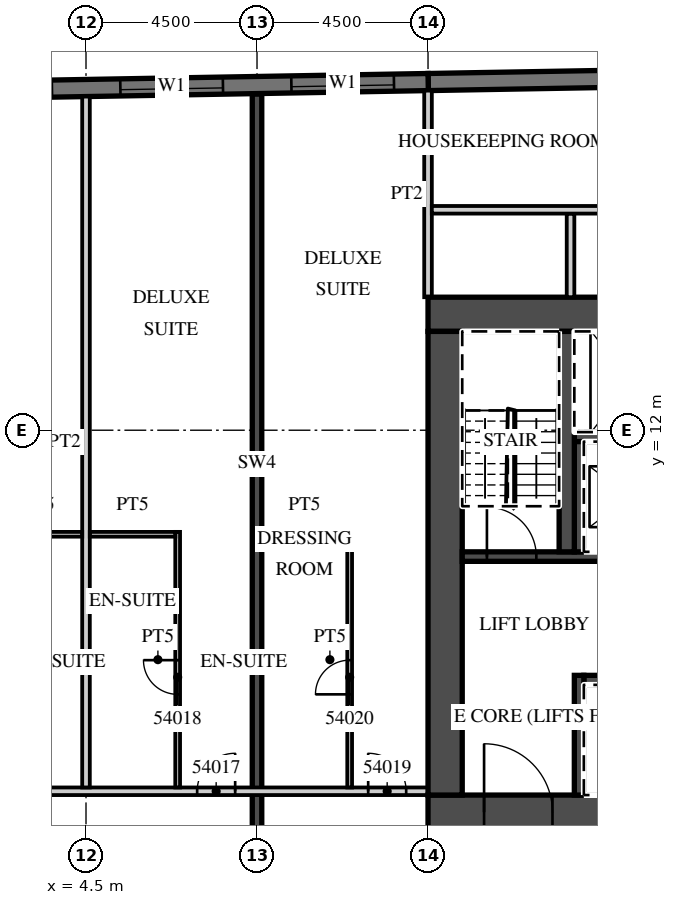
"""IFC4 building model, lengths in metres.
Left out: names, types, materials, properties, quantities, classifications, styles, units other than length and angle.
Written with IfcOpenShell. Run it as: python <this file> out.ifc"""

import sys

from ifc_helpers import new_model, si_unit, direction, frame, frame_2d, origin, place, context, subcontext, project, spatial, rectangle, extrude, element, fill, save


model = new_model("IFC4")
c1 = context("Model", 3, precision=1e-05, world=origin(), true_north=direction((0.0, 1.0)))
c2 = subcontext(c1, "Body", "Model", "MODEL_VIEW")
j1 = project(units=[si_unit("LENGTHUNIT", "METRE"), si_unit("PLANEANGLEUNIT", "RADIAN")], contexts=[c1])
p1 = place(None, origin())
s1 = spatial("IfcSite", under=j1, at=p1, CompositionType="ELEMENT")
p2 = place(p1, origin())
s2 = spatial("IfcBuilding", under=s1, at=p2, CompositionType="ELEMENT")
p3 = place(p2, frame((0.0, 0.0, 224.3)))
s3 = spatial("IfcBuildingStorey", under=s2, at=p3, CompositionType="ELEMENT", Elevation=224.3)
p4 = place(p3, frame((9.0, 1.4, 0.0), z_axis=(0.0, 0.0, 1.0), x_axis=(0.0, 1.0, 0.0)))
e1 = element("IfcWall", 1, at=p4, inside=s3, PredefinedType="SHEAR", context=c2, shape_type="SweptSolid", body=[
    extrude(rectangle(XDim=19.446, YDim=0.25, at=frame_2d((9.723, 0.0))), origin(), (0.0, 0.0, 1.0), 3.3),
])
p5 = place(p3, frame((31.504, 21.476, 0.0), z_axis=(0.0, 0.0, 1.0), x_axis=(-0.999847677887, -0.017453395744, 0.0)))
e2 = element("IfcWall", 2, at=p5, inside=s3, PredefinedType="SOLIDWALL", context=c2, shape_type="SweptSolid", body=[
    extrude(rectangle(XDim=18.003, YDim=0.45, at=frame_2d((9.001, 0.0))), origin(), (0.0, 0.0, 1.0), 3.02),
])
p6 = place(p3, frame((13.504, 21.161, 0.0), z_axis=(0.0, 0.0, 1.0), x_axis=(-0.999847763257, -0.017448504532, 0.0)))
e3 = element("IfcWall", 3, at=p6, inside=s3, PredefinedType="SOLIDWALL", context=c2, shape_type="SweptSolid", body=[
    extrude(rectangle(XDim=46.859, YDim=0.45, at=frame_2d((23.43, 0.0))), origin(), (0.0, 0.0, 1.0), 3.02),
])
p7 = place(p6, frame((0.9, 0.0, 0.45)))
e4 = element("IfcOpeningElement", 4, at=p7, cuts=e3, PredefinedType="OPENING", context=c2, shape_type="SweptSolid", body=[
    extrude(rectangle(XDim=2.7, YDim=2.25, at=frame_2d((1.35, 1.125))), frame((0.0, 0.235, 0.0), z_axis=(0.0, -1.0, 0.0), x_axis=(1.0, 0.0, 0.0)), (0.0, 0.0, 1.0), 0.47),
])
p8 = place(p6, frame((5.401, 0.0, 0.45)))
e5 = element("IfcOpeningElement", 5, at=p8, cuts=e3, PredefinedType="OPENING", context=c2, shape_type="SweptSolid", body=[
    extrude(rectangle(XDim=2.7, YDim=2.25, at=frame_2d((1.35, 1.125))), frame((0.0, 0.235, 0.0), z_axis=(0.0, -1.0, 0.0), x_axis=(1.0, 0.0, 0.0)), (0.0, 0.0, 1.0), 0.47),
])
p9 = place(p6, frame((9.902, 0.0, 0.45)))
e6 = element("IfcOpeningElement", 6, at=p9, cuts=e3, PredefinedType="OPENING", context=c2, shape_type="SweptSolid", body=[
    extrude(rectangle(XDim=2.7, YDim=2.25, at=frame_2d((1.35, 1.125))), frame((0.0, 0.235, 0.0), z_axis=(0.0, -1.0, 0.0), x_axis=(1.0, 0.0, 0.0)), (0.0, 0.0, 1.0), 0.47),
])
p10 = place(p6, frame((14.402, 0.0, 0.45)))
e7 = element("IfcOpeningElement", 7, at=p10, cuts=e3, PredefinedType="OPENING", context=c2, shape_type="SweptSolid", body=[
    extrude(rectangle(XDim=2.7, YDim=2.25, at=frame_2d((1.35, 1.125))), frame((0.0, 0.235, 0.0), z_axis=(0.0, -1.0, 0.0), x_axis=(1.0, 0.0, 0.0)), (0.0, 0.0, 1.0), 0.47),
])
p11 = place(p6, frame((18.903, 0.0, 0.45)))
e8 = element("IfcOpeningElement", 8, at=p11, cuts=e3, PredefinedType="OPENING", context=c2, shape_type="SweptSolid", body=[
    extrude(rectangle(XDim=2.7, YDim=2.25, at=frame_2d((1.35, 1.125))), frame((0.0, 0.235, 0.0), z_axis=(0.0, -1.0, 0.0), x_axis=(1.0, 0.0, 0.0)), (0.0, 0.0, 1.0), 0.47),
])
p12 = place(p6, frame((23.404, 0.0, 0.45)))
e9 = element("IfcOpeningElement", 9, at=p12, cuts=e3, PredefinedType="OPENING", context=c2, shape_type="SweptSolid", body=[
    extrude(rectangle(XDim=2.7, YDim=2.25, at=frame_2d((1.35, 1.125))), frame((0.0, 0.235, 0.0), z_axis=(0.0, -1.0, 0.0), x_axis=(1.0, 0.0, 0.0)), (0.0, 0.0, 1.0), 0.47),
])
p13 = place(p6, frame((27.904, 0.0, 0.45)))
e10 = element("IfcOpeningElement", 10, at=p13, cuts=e3, PredefinedType="OPENING", context=c2, shape_type="SweptSolid", body=[
    extrude(rectangle(XDim=2.7, YDim=2.25, at=frame_2d((1.35, 1.125))), frame((0.0, 0.235, 0.0), z_axis=(0.0, -1.0, 0.0), x_axis=(1.0, 0.0, 0.0)), (0.0, 0.0, 1.0), 0.47),
])
p14 = place(p6, frame((32.405, 0.0, 0.45)))
e11 = element("IfcOpeningElement", 11, at=p14, cuts=e3, PredefinedType="OPENING", context=c2, shape_type="SweptSolid", body=[
    extrude(rectangle(XDim=2.7, YDim=2.25, at=frame_2d((1.35, 1.125))), frame((0.0, 0.235, 0.0), z_axis=(0.0, -1.0, 0.0), x_axis=(1.0, 0.0, 0.0)), (0.0, 0.0, 1.0), 0.47),
])
p15 = place(p6, frame((36.906, 0.0, 0.45)))
e12 = element("IfcOpeningElement", 12, at=p15, cuts=e3, PredefinedType="OPENING", context=c2, shape_type="SweptSolid", body=[
    extrude(rectangle(XDim=2.7, YDim=2.25, at=frame_2d((1.35, 1.125))), frame((0.0, 0.235, 0.0), z_axis=(0.0, -1.0, 0.0), x_axis=(1.0, 0.0, 0.0)), (0.0, 0.0, 1.0), 0.47),
])
p16 = place(p6, frame((41.406, 0.0, 0.45)))
e13 = element("IfcOpeningElement", 13, at=p16, cuts=e3, PredefinedType="OPENING", context=c2, shape_type="SweptSolid", body=[
    extrude(rectangle(XDim=2.7, YDim=2.25, at=frame_2d((1.35, 1.125))), frame((0.0, 0.235, 0.0), z_axis=(0.0, -1.0, 0.0), x_axis=(1.0, 0.0, 0.0)), (0.0, 0.0, 1.0), 0.47),
])
p17 = place(p3, frame((13.5, 15.5, 0.0), z_axis=(0.0, 0.0, 1.0), x_axis=(0.0, 1.0, 0.0)))
e14 = element("IfcWall", 14, at=p17, inside=s3, PredefinedType="PARTITIONING", context=c2, shape_type="SweptSolid", body=[
    extrude(rectangle(XDim=5.436, YDim=0.2, at=frame_2d((2.718, 0.0))), origin(), (0.0, 0.0, 1.0), 3.02),
])
p18 = place(p3, frame((-13.5, 2.5, 0.0), z_axis=(0.0, 0.0, 1.0), x_axis=(1.0, 0.0, 0.0)))
e15 = element("IfcWall", 15, at=p18, inside=s3, PredefinedType="PARTITIONING", context=c2, shape_type="SweptSolid", body=[
    extrude(rectangle(XDim=27.0, YDim=0.2, at=frame_2d((13.5, 0.0))), origin(), (0.0, 0.0, 1.0), 3.02),
])
p19 = place(p18, frame((2.925, 0.0, 0.0)))
e16 = element("IfcOpeningElement", 16, at=p19, cuts=e15, PredefinedType="OPENING", context=c2, shape_type="SweptSolid", body=[
    extrude(rectangle(XDim=1.0, YDim=2.1, at=frame_2d((0.5, 1.05))), frame((0.0, 0.11, 0.0), z_axis=(0.0, -1.0, 0.0), x_axis=(1.0, 0.0, 0.0)), (0.0, 0.0, 1.0), 0.22),
])
p20 = place(p18, frame((7.45, 0.0, 0.0)))
e17 = element("IfcOpeningElement", 17, at=p20, cuts=e15, PredefinedType="OPENING", context=c2, shape_type="SweptSolid", body=[
    extrude(rectangle(XDim=1.0, YDim=2.1, at=frame_2d((0.5, 1.05))), frame((0.0, 0.11, 0.0), z_axis=(0.0, -1.0, 0.0), x_axis=(1.0, 0.0, 0.0)), (0.0, 0.0, 1.0), 0.22),
])
p21 = place(p18, frame((11.925, 0.0, 0.0)))
e18 = element("IfcOpeningElement", 18, at=p21, cuts=e15, PredefinedType="OPENING", context=c2, shape_type="SweptSolid", body=[
    extrude(rectangle(XDim=1.0, YDim=2.1, at=frame_2d((0.5, 1.05))), frame((0.0, 0.11, 0.0), z_axis=(0.0, -1.0, 0.0), x_axis=(1.0, 0.0, 0.0)), (0.0, 0.0, 1.0), 0.22),
])
p22 = place(p18, frame((14.075, 0.0, 0.0)))
e19 = element("IfcOpeningElement", 19, at=p22, cuts=e15, PredefinedType="OPENING", context=c2, shape_type="SweptSolid", body=[
    extrude(rectangle(XDim=1.0, YDim=2.1, at=frame_2d((0.5, 1.05))), frame((0.0, 0.11, 0.0), z_axis=(0.0, -1.0, 0.0), x_axis=(1.0, 0.0, 0.0)), (0.0, 0.0, 1.0), 0.22),
])
p23 = place(p18, frame((20.925, 0.0, 0.0)))
e20 = element("IfcOpeningElement", 20, at=p23, cuts=e15, PredefinedType="OPENING", context=c2, shape_type="SweptSolid", body=[
    extrude(rectangle(XDim=1.0, YDim=2.1, at=frame_2d((0.5, 1.05))), frame((0.0, 0.11, 0.0), z_axis=(0.0, -1.0, 0.0), x_axis=(1.0, 0.0, 0.0)), (0.0, 0.0, 1.0), 0.22),
])
p24 = place(p18, frame((25.425, 0.0, 0.0)))
e21 = element("IfcOpeningElement", 21, at=p24, cuts=e15, PredefinedType="OPENING", context=c2, shape_type="SweptSolid", body=[
    extrude(rectangle(XDim=1.0, YDim=2.1, at=frame_2d((0.5, 1.05))), frame((0.0, 0.11, 0.0), z_axis=(0.0, -1.0, 0.0), x_axis=(1.0, 0.0, 0.0)), (0.0, 0.0, 1.0), 0.22),
])
p25 = place(p3, frame((4.5, 2.6, 0.0), z_axis=(0.0, 0.0, 1.0), x_axis=(0.0, 1.0, 0.0)))
e22 = element("IfcWall", 22, at=p25, inside=s3, PredefinedType="PARTITIONING", context=c2, shape_type="SweptSolid", body=[
    extrude(rectangle(XDim=18.179, YDim=0.2, at=frame_2d((9.089, 0.0))), origin(), (0.0, 0.0, 1.0), 3.02),
])
p26 = place(p3, frame((2.15, 9.262, 0.0), z_axis=(0.0, 0.0, 1.0), x_axis=(1.0, 0.0, 0.0)))
e23 = element("IfcWall", 23, at=p26, inside=s3, PredefinedType="PARTITIONING", context=c2, shape_type="SweptSolid", body=[
    extrude(rectangle(XDim=2.25, YDim=0.125, at=frame_2d((1.125, 0.0))), origin(), (0.0, 0.0, 1.0), 3.02),
])
p27 = place(p3, frame((6.912, 2.6, 0.0), z_axis=(0.0, 0.0, 1.0), x_axis=(0.0, 1.0, 0.0)))
e24 = element("IfcWall", 24, at=p27, inside=s3, PredefinedType="PARTITIONING", context=c2, shape_type="SweptSolid", body=[
    extrude(rectangle(XDim=6.725, YDim=0.125, at=frame_2d((3.362, 0.0))), origin(), (0.0, 0.0, 1.0), 3.02),
])
p28 = place(p27, frame((2.45, 0.0, 0.0)))
e25 = element("IfcOpeningElement", 25, at=p28, cuts=e24, PredefinedType="OPENING", context=c2, shape_type="SweptSolid", body=[
    extrude(rectangle(XDim=0.9, YDim=2.1, at=frame_2d((0.45, 1.05))), frame((0.0, 0.073, 0.0), z_axis=(0.0, -1.0, 0.0), x_axis=(1.0, 0.0, 0.0)), (0.0, 0.0, 1.0), 0.145),
])
p29 = place(p3, frame((4.6, 9.262, 0.0), z_axis=(0.0, 0.0, 1.0), x_axis=(1.0, 0.0, 0.0)))
e26 = element("IfcWall", 26, at=p29, inside=s3, PredefinedType="PARTITIONING", context=c2, shape_type="SweptSolid", body=[
    extrude(rectangle(XDim=2.25, YDim=0.125, at=frame_2d((1.125, 0.0))), origin(), (0.0, 0.0, 1.0), 3.02),
])
p30 = place(p3, frame((11.438, 2.6, 0.0), z_axis=(0.0, 0.0, 1.0), x_axis=(0.0, 1.0, 0.0)))
e27 = element("IfcWall", 27, at=p30, inside=s3, PredefinedType="PARTITIONING", context=c2, shape_type="SweptSolid", body=[
    extrude(rectangle(XDim=6.725, YDim=0.125, at=frame_2d((3.362, 0.0))), origin(), (0.0, 0.0, 1.0), 3.02),
])
p31 = place(p30, frame((2.45, 0.0, 0.0)))
e28 = element("IfcOpeningElement", 28, at=p31, cuts=e27, PredefinedType="OPENING", context=c2, shape_type="SweptSolid", body=[
    extrude(rectangle(XDim=0.9, YDim=2.1, at=frame_2d((0.45, 1.05))), frame((0.0, 0.073, 0.0), z_axis=(0.0, -1.0, 0.0), x_axis=(1.0, 0.0, 0.0)), (0.0, 0.0, 1.0), 0.145),
])
p32 = place(p3, frame((9.125, 9.262, 0.0), z_axis=(0.0, 0.0, 1.0), x_axis=(1.0, 0.0, 0.0)))
e29 = element("IfcWall", 29, at=p32, inside=s3, PredefinedType="PARTITIONING", context=c2, shape_type="SweptSolid", body=[
    extrude(rectangle(XDim=2.25, YDim=0.125, at=frame_2d((1.125, 0.0))), origin(), (0.0, 0.0, 1.0), 3.02),
])
p33 = place(p3, frame((13.5, 1.95, 0.0), z_axis=(0.0, 0.0, 1.0), x_axis=(1.0, 0.0, 0.0)))
e30 = element("IfcWall", 30, at=p33, inside=s3, PredefinedType="SHEAR", context=c2, shape_type="SweptSolid", body=[
    extrude(rectangle(XDim=18.0, YDim=0.9, at=frame_2d((9.0, 0.0))), origin(), (0.0, 0.0, 1.0), 3.02),
])
p34 = place(p33, frame((1.475, 0.0, 0.0)))
e31 = element("IfcOpeningElement", 31, at=p34, cuts=e30, PredefinedType="OPENING", context=c2, shape_type="SweptSolid", body=[
    extrude(rectangle(XDim=1.8, YDim=2.1, at=frame_2d((0.9, 1.05))), frame((0.0, 0.46, 0.0), z_axis=(0.0, -1.0, 0.0), x_axis=(1.0, 0.0, 0.0)), (0.0, 0.0, 1.0), 0.92),
])
p35 = place(p3, frame((13.5, 15.05, 0.0), z_axis=(0.0, 0.0, 1.0), x_axis=(1.0, 0.0, 0.0)))
e32 = element("IfcWall", 32, at=p35, inside=s3, PredefinedType="SHEAR", context=c2, shape_type="SweptSolid", body=[
    extrude(rectangle(XDim=6.8, YDim=0.9, at=frame_2d((3.4, 0.0))), origin(), (0.0, 0.0, 1.0), 3.02),
])
p36 = place(p35, frame((4.725, 0.0, 0.0)))
e33 = element("IfcOpeningElement", 33, at=p36, cuts=e32, PredefinedType="OPENING", context=c2, shape_type="SweptSolid", body=[
    extrude(rectangle(XDim=1.2, YDim=2.1, at=frame_2d((0.6, 1.05))), frame((0.0, 0.46, 0.0), z_axis=(0.0, -1.0, 0.0), x_axis=(1.0, 0.0, 0.0)), (0.0, 0.0, 1.0), 0.92),
])
p37 = place(p3, frame((13.95, 2.4, 0.0), z_axis=(0.0, 0.0, 1.0), x_axis=(0.0, 1.0, 0.0)))
e34 = element("IfcWall", 34, at=p37, inside=s3, PredefinedType="SHEAR", context=c2, shape_type="SweptSolid", body=[
    extrude(rectangle(XDim=12.2, YDim=0.9, at=frame_2d((6.1, 0.0))), origin(), (0.0, 0.0, 1.0), 3.02),
])
p38 = place(p3, frame((17.6, 5.425, 0.0), z_axis=(0.0, 0.0, 1.0), x_axis=(1.0, 0.0, 0.0)))
e35 = element("IfcWall", 35, at=p38, inside=s3, PredefinedType="SHEAR", context=c2, shape_type="SweptSolid", body=[
    extrude(rectangle(XDim=13.0, YDim=0.25, at=frame_2d((6.5, 0.0))), origin(), (0.0, 0.0, 1.0), 3.02),
])
p39 = place(p38, frame((8.475, 0.0, 0.0)))
e36 = element("IfcOpeningElement", 36, at=p39, cuts=e35, PredefinedType="OPENING", context=c2, shape_type="SweptSolid", body=[
    extrude(rectangle(XDim=1.2, YDim=2.1, at=frame_2d((0.6, 1.05))), frame((0.0, 0.135, 0.0), z_axis=(0.0, -1.0, 0.0), x_axis=(1.0, 0.0, 0.0)), (0.0, 0.0, 1.0), 0.27),
])
p40 = place(p38, frame((5.875, 0.0, 0.0)))
e37 = element("IfcOpeningElement", 37, at=p40, cuts=e35, PredefinedType="OPENING", context=c2, shape_type="SweptSolid", body=[
    extrude(rectangle(XDim=1.2, YDim=2.1, at=frame_2d((0.6, 1.05))), frame((0.0, 0.135, 0.0), z_axis=(0.0, -1.0, 0.0), x_axis=(1.0, 0.0, 0.0)), (0.0, 0.0, 1.0), 0.27),
])
p41 = place(p3, frame((17.475, 2.4, 0.0), z_axis=(0.0, 0.0, 1.0), x_axis=(0.0, 1.0, 0.0)))
e38 = element("IfcWall", 38, at=p41, inside=s3, PredefinedType="SHEAR", context=c2, shape_type="SweptSolid", body=[
    extrude(rectangle(XDim=3.15, YDim=0.25, at=frame_2d((1.575, 0.0))), origin(), (0.0, 0.0, 1.0), 3.02),
])
p42 = place(p3, frame((14.4, 8.675, 0.0), z_axis=(0.0, 0.0, 1.0), x_axis=(1.0, 0.0, 0.0)))
e39 = element("IfcWall", 39, at=p42, inside=s3, PredefinedType="SHEAR", context=c2, shape_type="SweptSolid", body=[
    extrude(rectangle(XDim=16.2, YDim=0.25, at=frame_2d((8.1, 0.0))), origin(), (0.0, 0.0, 1.0), 3.02),
])
p43 = place(p42, frame((6.45, 0.0, 0.0)))
e40 = element("IfcOpeningElement", 40, at=p43, cuts=e39, PredefinedType="OPENING", context=c2, shape_type="SweptSolid", body=[
    extrude(rectangle(XDim=1.2, YDim=2.1, at=frame_2d((0.6, 1.05))), frame((0.0, 0.135, 0.0), z_axis=(0.0, -1.0, 0.0), x_axis=(1.0, 0.0, 0.0)), (0.0, 0.0, 1.0), 0.27),
])
p44 = place(p42, frame((3.8, 0.0, 0.0)))
e41 = element("IfcOpeningElement", 41, at=p44, cuts=e39, PredefinedType="OPENING", context=c2, shape_type="SweptSolid", body=[
    extrude(rectangle(XDim=1.2, YDim=2.1, at=frame_2d((0.6, 1.05))), frame((0.0, 0.135, 0.0), z_axis=(0.0, -1.0, 0.0), x_axis=(1.0, 0.0, 0.0)), (0.0, 0.0, 1.0), 0.27),
])
p45 = place(p42, frame((0.65, 0.0, 0.0)))
e42 = element("IfcOpeningElement", 42, at=p45, cuts=e39, PredefinedType="OPENING", context=c2, shape_type="SweptSolid", body=[
    extrude(rectangle(XDim=1.3, YDim=2.1, at=frame_2d((0.65, 1.05))), frame((0.0, 0.135, 0.0), z_axis=(0.0, -1.0, 0.0), x_axis=(1.0, 0.0, 0.0)), (0.0, 0.0, 1.0), 0.27),
])
p46 = place(p42, frame((13.562, 0.0, 0.0)))
e43 = element("IfcOpeningElement", 43, at=p46, cuts=e39, PredefinedType="OPENING", context=c2, shape_type="SweptSolid", body=[
    extrude(rectangle(XDim=1.0, YDim=2.1, at=frame_2d((0.5, 1.05))), frame((0.0, 0.135, 0.0), z_axis=(0.0, -1.0, 0.0), x_axis=(1.0, 0.0, 0.0)), (0.0, 0.0, 1.0), 0.27),
])
p47 = place(p42, frame((9.587, 0.0, 0.0)))
e44 = element("IfcOpeningElement", 44, at=p47, cuts=e39, PredefinedType="OPENING", context=c2, shape_type="SweptSolid", body=[
    extrude(rectangle(XDim=1.0, YDim=2.1, at=frame_2d((0.5, 1.05))), frame((0.0, 0.135, 0.0), z_axis=(0.0, -1.0, 0.0), x_axis=(1.0, 0.0, 0.0)), (0.0, 0.0, 1.0), 0.27),
])
p48 = place(p3, frame((17.35, 11.825, 0.0), z_axis=(0.0, 0.0, 1.0), x_axis=(1.0, 0.0, 0.0)))
e45 = element("IfcWall", 45, at=p48, inside=s3, PredefinedType="SHEAR", context=c2, shape_type="SweptSolid", body=[
    extrude(rectangle(XDim=13.25, YDim=0.25, at=frame_2d((6.625, 0.0))), origin(), (0.0, 0.0, 1.0), 3.02),
])
p49 = place(p3, frame((17.475, 8.8, 0.0), z_axis=(0.0, 0.0, 1.0), x_axis=(0.0, 1.0, 0.0)))
e46 = element("IfcWall", 46, at=p49, inside=s3, PredefinedType="SHEAR", context=c2, shape_type="SweptSolid", body=[
    extrude(rectangle(XDim=2.9, YDim=0.25, at=frame_2d((1.45, 0.0))), origin(), (0.0, 0.0, 1.0), 3.02),
])
p50 = place(p3, frame((17.15, 8.8, 0.0), z_axis=(0.0, 0.0, 1.0), x_axis=(0.0, 1.0, 0.0)))
e47 = element("IfcWall", 47, at=p50, inside=s3, PredefinedType="SHEAR", context=c2, shape_type="SweptSolid", body=[
    extrude(rectangle(XDim=5.8, YDim=0.4, at=frame_2d((2.9, 0.0))), origin(), (0.0, 0.0, 1.0), 3.02),
])
p51 = place(p3, frame((17.25, 15.5, 0.0), z_axis=(0.0, 0.0, 1.0), x_axis=(0.0, 1.0, 0.0)))
e48 = element("IfcWall", 48, at=p51, inside=s3, PredefinedType="PARTITIONING", context=c2, shape_type="SweptSolid", body=[
    extrude(rectangle(XDim=2.2, YDim=0.2, at=frame_2d((1.1, 0.0))), origin(), (0.0, 0.0, 1.0), 3.02),
])
p52 = place(p3, frame((13.6, 17.8, 0.0), z_axis=(0.0, 0.0, 1.0), x_axis=(1.0, 0.0, 0.0)))
e49 = element("IfcWall", 49, at=p52, inside=s3, PredefinedType="PARTITIONING", context=c2, shape_type="SweptSolid", body=[
    extrude(rectangle(XDim=28.657, YDim=0.2, at=frame_2d((14.329, 0.0))), origin(), (0.0, 0.0, 1.0), 3.02),
])
p53 = place(p52, frame((17.812, 0.0, 0.0)))
e50 = element("IfcOpeningElement", 50, at=p53, cuts=e49, PredefinedType="OPENING", context=c2, shape_type="SweptSolid", body=[
    extrude(rectangle(XDim=0.9, YDim=2.1, at=frame_2d((0.45, 1.05))), frame((0.0, 0.11, 0.0), z_axis=(0.0, -1.0, 0.0), x_axis=(1.0, 0.0, 0.0)), (0.0, 0.0, 1.0), 0.22),
])
p54 = place(p52, frame((9.512, 0.0, 0.0)))
e51 = element("IfcOpeningElement", 51, at=p54, cuts=e49, PredefinedType="OPENING", context=c2, shape_type="SweptSolid", body=[
    extrude(rectangle(XDim=0.9, YDim=2.1, at=frame_2d((0.45, 1.05))), frame((0.0, 0.11, 0.0), z_axis=(0.0, -1.0, 0.0), x_axis=(1.0, 0.0, 0.0)), (0.0, 0.0, 1.0), 0.22),
])
p55 = place(p7, origin())
e52 = element("IfcWindow", 52, at=p55, inside=s3, PartitioningType="SINGLE_PANEL", PredefinedType="WINDOW", context=c2, shape_type="SweptSolid", body=[
    extrude(rectangle(XDim=2.7, YDim=2.25, at=frame_2d((1.35, 1.125))), frame((0.0, 0.09, 0.0), z_axis=(0.0, -1.0, 0.0), x_axis=(1.0, 0.0, 0.0)), (0.0, 0.0, 1.0), 0.06),
])
fill(e4, e52)
p56 = place(p8, origin())
e53 = element("IfcWindow", 53, at=p56, inside=s3, PartitioningType="SINGLE_PANEL", PredefinedType="WINDOW", context=c2, shape_type="SweptSolid", body=[
    extrude(rectangle(XDim=2.7, YDim=2.25, at=frame_2d((1.35, 1.125))), frame((0.0, 0.09, 0.0), z_axis=(0.0, -1.0, 0.0), x_axis=(1.0, 0.0, 0.0)), (0.0, 0.0, 1.0), 0.06),
])
fill(e5, e53)
p57 = place(p9, origin())
e54 = element("IfcWindow", 54, at=p57, inside=s3, PartitioningType="SINGLE_PANEL", PredefinedType="WINDOW", context=c2, shape_type="SweptSolid", body=[
    extrude(rectangle(XDim=2.7, YDim=2.25, at=frame_2d((1.35, 1.125))), frame((0.0, 0.09, 0.0), z_axis=(0.0, -1.0, 0.0), x_axis=(1.0, 0.0, 0.0)), (0.0, 0.0, 1.0), 0.06),
])
fill(e6, e54)
p58 = place(p23, origin())
e55 = element("IfcDoor", 55, at=p58, inside=s3, OperationType="SINGLE_SWING_RIGHT", PredefinedType="DOOR", context=c2, shape_type="SweptSolid", body=[
    extrude(rectangle(XDim=1.0, YDim=2.1, at=frame_2d((0.5, 1.05))), frame((0.0, 0.025, 0.0), z_axis=(0.0, -1.0, 0.0), x_axis=(1.0, 0.0, 0.0)), (0.0, 0.0, 1.0), 0.05),
])
fill(e20, e55)
p59 = place(p28, origin())
e56 = element("IfcDoor", 56, at=p59, inside=s3, OperationType="SINGLE_SWING_RIGHT", PredefinedType="DOOR", context=c2, shape_type="SweptSolid", body=[
    extrude(rectangle(XDim=0.9, YDim=2.1, at=frame_2d((0.45, 1.05))), frame((0.0, 0.025, 0.0), z_axis=(0.0, -1.0, 0.0), x_axis=(1.0, 0.0, 0.0)), (0.0, 0.0, 1.0), 0.05),
])
fill(e25, e56)
p60 = place(p24, origin())
e57 = element("IfcDoor", 57, at=p60, inside=s3, OperationType="SINGLE_SWING_LEFT", PredefinedType="DOOR", context=c2, shape_type="SweptSolid", body=[
    extrude(rectangle(XDim=1.0, YDim=2.1, at=frame_2d((0.5, 1.05))), frame((0.0, 0.025, 0.0), z_axis=(0.0, -1.0, 0.0), x_axis=(1.0, 0.0, 0.0)), (0.0, 0.0, 1.0), 0.05),
])
fill(e21, e57)
p61 = place(p31, origin())
e58 = element("IfcDoor", 58, at=p61, inside=s3, OperationType="SINGLE_SWING_LEFT", PredefinedType="DOOR", context=c2, shape_type="SweptSolid", body=[
    extrude(rectangle(XDim=0.9, YDim=2.1, at=frame_2d((0.45, 1.05))), frame((0.0, 0.025, 0.0), z_axis=(0.0, -1.0, 0.0), x_axis=(1.0, 0.0, 0.0)), (0.0, 0.0, 1.0), 0.05),
])
fill(e28, e58)
p62 = place(p34, origin())
e59 = element("IfcDoor", 59, at=p62, inside=s3, OperationType="DOUBLE_DOOR_DOUBLE_SWING", PredefinedType="DOOR", context=c2, shape_type="SweptSolid", body=[
    extrude(rectangle(XDim=1.8, YDim=2.1, at=frame_2d((0.9, 1.05))), frame((0.0, 0.025, 0.0), z_axis=(0.0, -1.0, 0.0), x_axis=(1.0, 0.0, 0.0)), (0.0, 0.0, 1.0), 0.05),
])
fill(e31, e59)
p63 = place(p45, origin())
e60 = element("IfcDoor", 60, at=p63, inside=s3, OperationType="SINGLE_SWING_LEFT", PredefinedType="DOOR", context=c2, shape_type="SweptSolid", body=[
    extrude(rectangle(XDim=1.3, YDim=2.1, at=frame_2d((0.65, 1.05))), frame((0.0, 0.025, 0.0), z_axis=(0.0, -1.0, 0.0), x_axis=(1.0, 0.0, 0.0)), (0.0, 0.0, 1.0), 0.05),
])
fill(e42, e60)
save(model, sys.argv[1])
